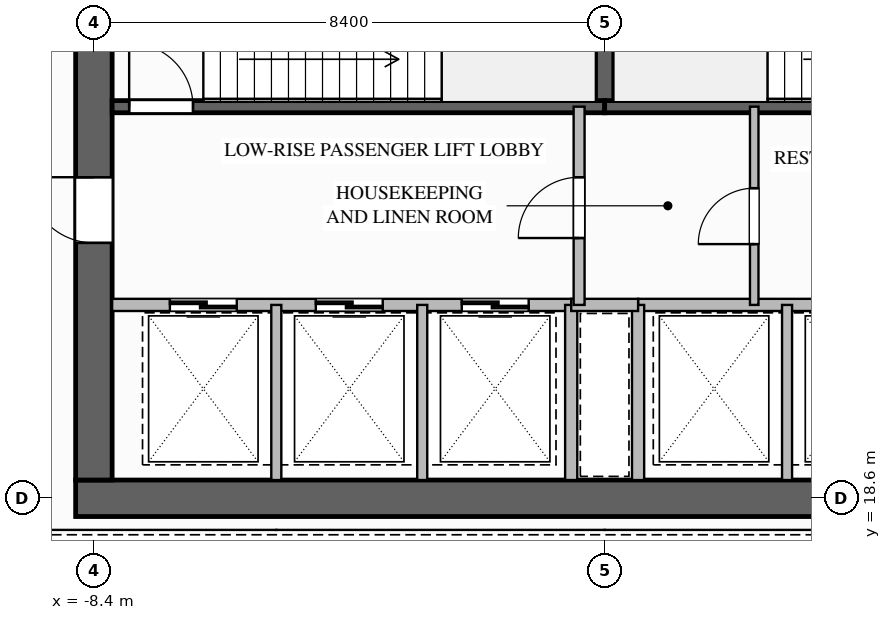
"""IFC4 building model, lengths in metres.
Left out: names, types, materials, properties, quantities, classifications, styles, units other than length and angle.
Written with IfcOpenShell. Run it as: python <this file> out.ifc"""

import sys

from ifc_helpers import new_model, si_unit, direction, frame, frame_2d, origin, place, context, subcontext, project, spatial, rectangle, extrude, element, fill, save


model = new_model("IFC4")
c1 = context("Model", 3, precision=1e-05, world=origin(), true_north=direction((0.0, 1.0)))
c2 = subcontext(c1, "Body", "Model", "MODEL_VIEW")
j1 = project(units=[si_unit("LENGTHUNIT", "METRE"), si_unit("PLANEANGLEUNIT", "RADIAN")], contexts=[c1])
p1 = place(None, origin())
s1 = spatial("IfcSite", under=j1, at=p1, CompositionType="ELEMENT")
p2 = place(p1, origin())
s2 = spatial("IfcBuilding", under=s1, at=p2, CompositionType="ELEMENT")
p3 = place(p2, frame((0.0, 0.0, 17.2)))
s3 = spatial("IfcBuildingStorey", under=s2, at=p3, CompositionType="ELEMENT", Elevation=17.2)
p4 = place(p3, frame((8.7, 18.6, 0.0), z_axis=(0.0, 0.0, 1.0), x_axis=(-1.0, 0.0, 0.0)))
e1 = element("IfcWall", 1, at=p4, inside=s3, PredefinedType="SHEAR", context=c2, shape_type="SweptSolid", body=[
    extrude(rectangle(XDim=17.4, YDim=0.6, at=frame_2d((8.7, 0.0))), origin(), (0.0, 0.0, 1.0), 5.2),
])
p5 = place(p3, frame((-8.4, 18.9, 0.0), z_axis=(0.0, 0.0, 1.0), x_axis=(0.0, 1.0, 0.0)))
e2 = element("IfcWall", 2, at=p5, inside=s3, PredefinedType="SHEAR", context=c2, shape_type="SweptSolid", body=[
    extrude(rectangle(XDim=16.2, YDim=0.6, at=frame_2d((8.1, 0.0))), origin(), (0.0, 0.0, 1.0), 5.2),
])
p6 = place(p5, frame((3.9, 0.0, 0.0)))
e3 = element("IfcOpeningElement", 3, at=p6, cuts=e2, PredefinedType="OPENING", context=c2, shape_type="SweptSolid", body=[
    extrude(rectangle(XDim=1.08, YDim=2.04, at=frame_2d((0.54, 1.02))), frame((0.0, 0.31, 0.0), z_axis=(0.0, -1.0, 0.0), x_axis=(1.0, 0.0, 0.0)), (0.0, 0.0, 1.0), 0.62),
])
p7 = place(p3, frame((0.0, 25.04, 0.0), z_axis=(0.0, 0.0, 1.0), x_axis=(0.0, 1.0, 0.0)))
e4 = element("IfcWall", 4, at=p7, inside=s3, PredefinedType="SOLIDWALL", context=c2, shape_type="SweptSolid", body=[
    extrude(rectangle(XDim=3.12, YDim=0.3, at=frame_2d((1.56, 0.0))), origin(), (0.0, 0.0, 1.0), 4.9),
])
p8 = place(p3, frame((-8.1, 25.04, 0.0), z_axis=(0.0, 0.0, 1.0), x_axis=(1.0, 0.0, 0.0)))
e5 = element("IfcWall", 5, at=p8, inside=s3, PredefinedType="SOLIDWALL", context=c2, shape_type="SweptSolid", body=[
    extrude(rectangle(XDim=8.1, YDim=0.2, at=frame_2d((4.05, 0.0))), origin(), (0.0, 0.0, 1.0), 4.9),
])
p9 = place(p8, frame((0.28, 0.0, 0.0)))
e6 = element("IfcOpeningElement", 6, at=p9, cuts=e5, PredefinedType="OPENING", context=c2, shape_type="SweptSolid", body=[
    extrude(rectangle(XDim=1.05, YDim=2.1, at=frame_2d((0.525, 1.05))), frame((0.0, 0.11, 0.0), z_axis=(0.0, -1.0, 0.0), x_axis=(1.0, 0.0, 0.0)), (0.0, 0.0, 1.0), 0.22),
])
p10 = place(p3, frame((0.0, 25.04, 0.0), z_axis=(0.0, 0.0, 1.0), x_axis=(1.0, 0.0, 0.0)))
e7 = element("IfcWall", 7, at=p10, inside=s3, PredefinedType="SOLIDWALL", context=c2, shape_type="SweptSolid", body=[
    extrude(rectangle(XDim=8.1, YDim=0.2, at=frame_2d((4.05, 0.0))), origin(), (0.0, 0.0, 1.0), 4.9),
])
p11 = place(p3, frame((-0.55, 21.78, 0.0), z_axis=(0.0, 0.0, 1.0), x_axis=(-1.0, 0.0, 0.0)))
e8 = element("IfcWall", 8, at=p11, inside=s3, PredefinedType="SOLIDWALL", context=c2, shape_type="SweptSolid", body=[
    extrude(rectangle(XDim=7.55, YDim=0.2, at=frame_2d((3.775, 0.0))), origin(), (0.0, 0.0, 1.0), 4.9),
])
p12 = place(p11, frame((5.5, 0.0, 0.0)))
e9 = element("IfcOpeningElement", 9, at=p12, cuts=e8, PredefinedType="OPENING", context=c2, shape_type="SweptSolid", body=[
    extrude(rectangle(XDim=1.1, YDim=2.2, at=frame_2d((0.55, 1.1))), frame((0.0, 0.11, 0.0), z_axis=(0.0, -1.0, 0.0), x_axis=(1.0, 0.0, 0.0)), (0.0, 0.0, 1.0), 0.22),
])
p13 = place(p11, frame((3.1, 0.0, 0.0)))
e10 = element("IfcOpeningElement", 10, at=p13, cuts=e8, PredefinedType="OPENING", context=c2, shape_type="SweptSolid", body=[
    extrude(rectangle(XDim=1.1, YDim=2.2, at=frame_2d((0.55, 1.1))), frame((0.0, 0.11, 0.0), z_axis=(0.0, -1.0, 0.0), x_axis=(1.0, 0.0, 0.0)), (0.0, 0.0, 1.0), 0.22),
])
p14 = place(p11, frame((0.7, 0.0, 0.0)))
e11 = element("IfcOpeningElement", 11, at=p14, cuts=e8, PredefinedType="OPENING", context=c2, shape_type="SweptSolid", body=[
    extrude(rectangle(XDim=1.1, YDim=2.2, at=frame_2d((0.55, 1.1))), frame((0.0, 0.11, 0.0), z_axis=(0.0, -1.0, 0.0), x_axis=(1.0, 0.0, 0.0)), (0.0, 0.0, 1.0), 0.22),
])
for number, where, z_axis, x_axis in (
    (12, (-5.4, 18.9, 0.0), (0.0, 0.0, 1.0), (0.0, 1.0, 0.0)),
    (13, (-3.0, 18.9, 0.0), (0.0, 0.0, 1.0), (0.0, 1.0, 0.0)),
):
    element("IfcWall", number, at=place(p3, frame(where, z_axis=z_axis, x_axis=x_axis)), inside=s3, PredefinedType="PARTITIONING", context=c2, shape_type="SweptSolid", body=[
        extrude(rectangle(XDim=2.88, YDim=0.165, at=frame_2d((1.44, 0.0))), origin(), (0.0, 0.0, 1.0), 4.9),
    ])
p15 = place(p3, frame((-0.55, 18.9, 0.0), z_axis=(0.0, 0.0, 1.0), x_axis=(0.0, 1.0, 0.0)))
e14 = element("IfcWall", 14, at=p15, inside=s3, PredefinedType="SOLIDWALL", context=c2, shape_type="SweptSolid", body=[
    extrude(rectangle(XDim=2.88, YDim=0.2, at=frame_2d((1.44, 0.0))), origin(), (0.0, 0.0, 1.0), 4.9),
])
p16 = place(p3, frame((8.1, 21.78, 0.0), z_axis=(0.0, 0.0, 1.0), x_axis=(-1.0, 0.0, 0.0)))
e15 = element("IfcWall", 15, at=p16, inside=s3, PredefinedType="SOLIDWALL", context=c2, shape_type="SweptSolid", body=[
    extrude(rectangle(XDim=7.55, YDim=0.2, at=frame_2d((3.775, 0.0))), origin(), (0.0, 0.0, 1.0), 4.9),
])
p17 = place(p3, frame((0.55, 18.9, 0.0), z_axis=(0.0, 0.0, 1.0), x_axis=(0.0, 1.0, 0.0)))
e16 = element("IfcWall", 16, at=p17, inside=s3, PredefinedType="SOLIDWALL", context=c2, shape_type="SweptSolid", body=[
    extrude(rectangle(XDim=2.88, YDim=0.2, at=frame_2d((1.44, 0.0))), origin(), (0.0, 0.0, 1.0), 4.9),
])
p18 = place(p3, frame((3.0, 18.9, 0.0), z_axis=(0.0, 0.0, 1.0), x_axis=(0.0, 1.0, 0.0)))
e17 = element("IfcWall", 17, at=p18, inside=s3, PredefinedType="PARTITIONING", context=c2, shape_type="SweptSolid", body=[
    extrude(rectangle(XDim=2.88, YDim=0.165, at=frame_2d((1.44, 0.0))), origin(), (0.0, 0.0, 1.0), 4.9),
])
p19 = place(p3, frame((-0.55, 21.78, 0.0), z_axis=(0.0, 0.0, 1.0), x_axis=(1.0, 0.0, 0.0)))
e18 = element("IfcWall", 18, at=p19, inside=s3, PredefinedType="SOLIDWALL", context=c2, shape_type="SweptSolid", body=[
    extrude(rectangle(XDim=1.1, YDim=0.2, at=frame_2d((0.55, 0.0))), origin(), (0.0, 0.0, 1.0), 4.9),
])
p20 = place(p3, frame((-0.42, 21.78, 0.0), z_axis=(0.0, 0.0, 1.0), x_axis=(0.0, 1.0, 0.0)))
e19 = element("IfcWall", 19, at=p20, inside=s3, PredefinedType="SOLIDWALL", context=c2, shape_type="SweptSolid", body=[
    extrude(rectangle(XDim=3.26, YDim=0.18, at=frame_2d((1.63, 0.0))), origin(), (0.0, 0.0, 1.0), 4.9),
])
p21 = place(p20, frame((1.1, 0.0, 0.0)))
e20 = element("IfcOpeningElement", 20, at=p21, cuts=e19, PredefinedType="OPENING", context=c2, shape_type="SweptSolid", body=[
    extrude(rectangle(XDim=1.0, YDim=2.1, at=frame_2d((0.5, 1.05))), frame((0.0, 0.1, 0.0), z_axis=(0.0, -1.0, 0.0), x_axis=(1.0, 0.0, 0.0)), (0.0, 0.0, 1.0), 0.2),
])
p22 = place(p3, frame((2.46, 21.78, 0.0), z_axis=(0.0, 0.0, 1.0), x_axis=(0.0, 1.0, 0.0)))
e21 = element("IfcWall", 21, at=p22, inside=s3, PredefinedType="PLUMBINGWALL", context=c2, shape_type="SweptSolid", body=[
    extrude(rectangle(XDim=3.26, YDim=0.14, at=frame_2d((1.63, 0.0))), origin(), (0.0, 0.0, 1.0), 4.9),
])
p23 = place(p22, frame((1.0, 0.0, 0.0)))
e22 = element("IfcOpeningElement", 22, at=p23, cuts=e21, PredefinedType="OPENING", context=c2, shape_type="SweptSolid", body=[
    extrude(rectangle(XDim=0.92, YDim=2.1, at=frame_2d((0.46, 1.05))), frame((0.0, 0.08, 0.0), z_axis=(0.0, -1.0, 0.0), x_axis=(1.0, 0.0, 0.0)), (0.0, 0.0, 1.0), 0.16),
])
p24 = place(p9, origin())
e23 = element("IfcDoor", 23, at=p24, inside=s3, OperationType="SINGLE_SWING_LEFT", PredefinedType="DOOR", context=c2, shape_type="SweptSolid", body=[
    extrude(rectangle(XDim=1.05, YDim=2.1, at=frame_2d((0.525, 1.05))), frame((0.0, 0.025, 0.0), z_axis=(0.0, -1.0, 0.0), x_axis=(1.0, 0.0, 0.0)), (0.0, 0.0, 1.0), 0.05),
])
fill(e6, e23)
p25 = place(p12, origin())
e24 = element("IfcDoor", 24, at=p25, inside=s3, OperationType="SLIDING_TO_LEFT", PredefinedType="DOOR", context=c2, shape_type="SweptSolid", body=[
    extrude(rectangle(XDim=1.1, YDim=2.2, at=frame_2d((0.55, 1.1))), frame((0.0, 0.025, 0.0), z_axis=(0.0, -1.0, 0.0), x_axis=(1.0, 0.0, 0.0)), (0.0, 0.0, 1.0), 0.05),
])
fill(e9, e24)
p26 = place(p13, origin())
e25 = element("IfcDoor", 25, at=p26, inside=s3, OperationType="SLIDING_TO_LEFT", PredefinedType="DOOR", context=c2, shape_type="SweptSolid", body=[
    extrude(rectangle(XDim=1.1, YDim=2.2, at=frame_2d((0.55, 1.1))), frame((0.0, 0.025, 0.0), z_axis=(0.0, -1.0, 0.0), x_axis=(1.0, 0.0, 0.0)), (0.0, 0.0, 1.0), 0.05),
])
fill(e10, e25)
p27 = place(p14, origin())
e26 = element("IfcDoor", 26, at=p27, inside=s3, OperationType="SLIDING_TO_LEFT", PredefinedType="DOOR", context=c2, shape_type="SweptSolid", body=[
    extrude(rectangle(XDim=1.1, YDim=2.2, at=frame_2d((0.55, 1.1))), frame((0.0, 0.025, 0.0), z_axis=(0.0, -1.0, 0.0), x_axis=(1.0, 0.0, 0.0)), (0.0, 0.0, 1.0), 0.05),
])
fill(e11, e26)
p28 = place(p21, origin())
e27 = element("IfcDoor", 27, at=p28, inside=s3, OperationType="SINGLE_SWING_LEFT", PredefinedType="DOOR", context=c2, shape_type="SweptSolid", body=[
    extrude(rectangle(XDim=1.0, YDim=2.1, at=frame_2d((0.5, 1.05))), frame((0.0, 0.025, 0.0), z_axis=(0.0, -1.0, 0.0), x_axis=(1.0, 0.0, 0.0)), (0.0, 0.0, 1.0), 0.05),
])
fill(e20, e27)
p29 = place(p6, origin())
e28 = element("IfcDoor", 28, at=p29, inside=s3, OperationType="SINGLE_SWING_RIGHT", PredefinedType="DOOR", context=c2, shape_type="SweptSolid", body=[
    extrude(rectangle(XDim=1.08, YDim=2.04, at=frame_2d((0.54, 1.02))), frame((0.0, 0.025, 0.0), z_axis=(0.0, -1.0, 0.0), x_axis=(1.0, 0.0, 0.0)), (0.0, 0.0, 1.0), 0.05),
])
fill(e3, e28)
p30 = place(p23, origin())
e29 = element("IfcDoor", 29, at=p30, inside=s3, OperationType="SINGLE_SWING_LEFT", PredefinedType="DOOR", context=c2, shape_type="SweptSolid", body=[
    extrude(rectangle(XDim=0.92, YDim=2.1, at=frame_2d((0.46, 1.05))), frame((0.0, 0.025, 0.0), z_axis=(0.0, -1.0, 0.0), x_axis=(1.0, 0.0, 0.0)), (0.0, 0.0, 1.0), 0.05),
])
fill(e22, e29)
save(model, sys.argv[1])
